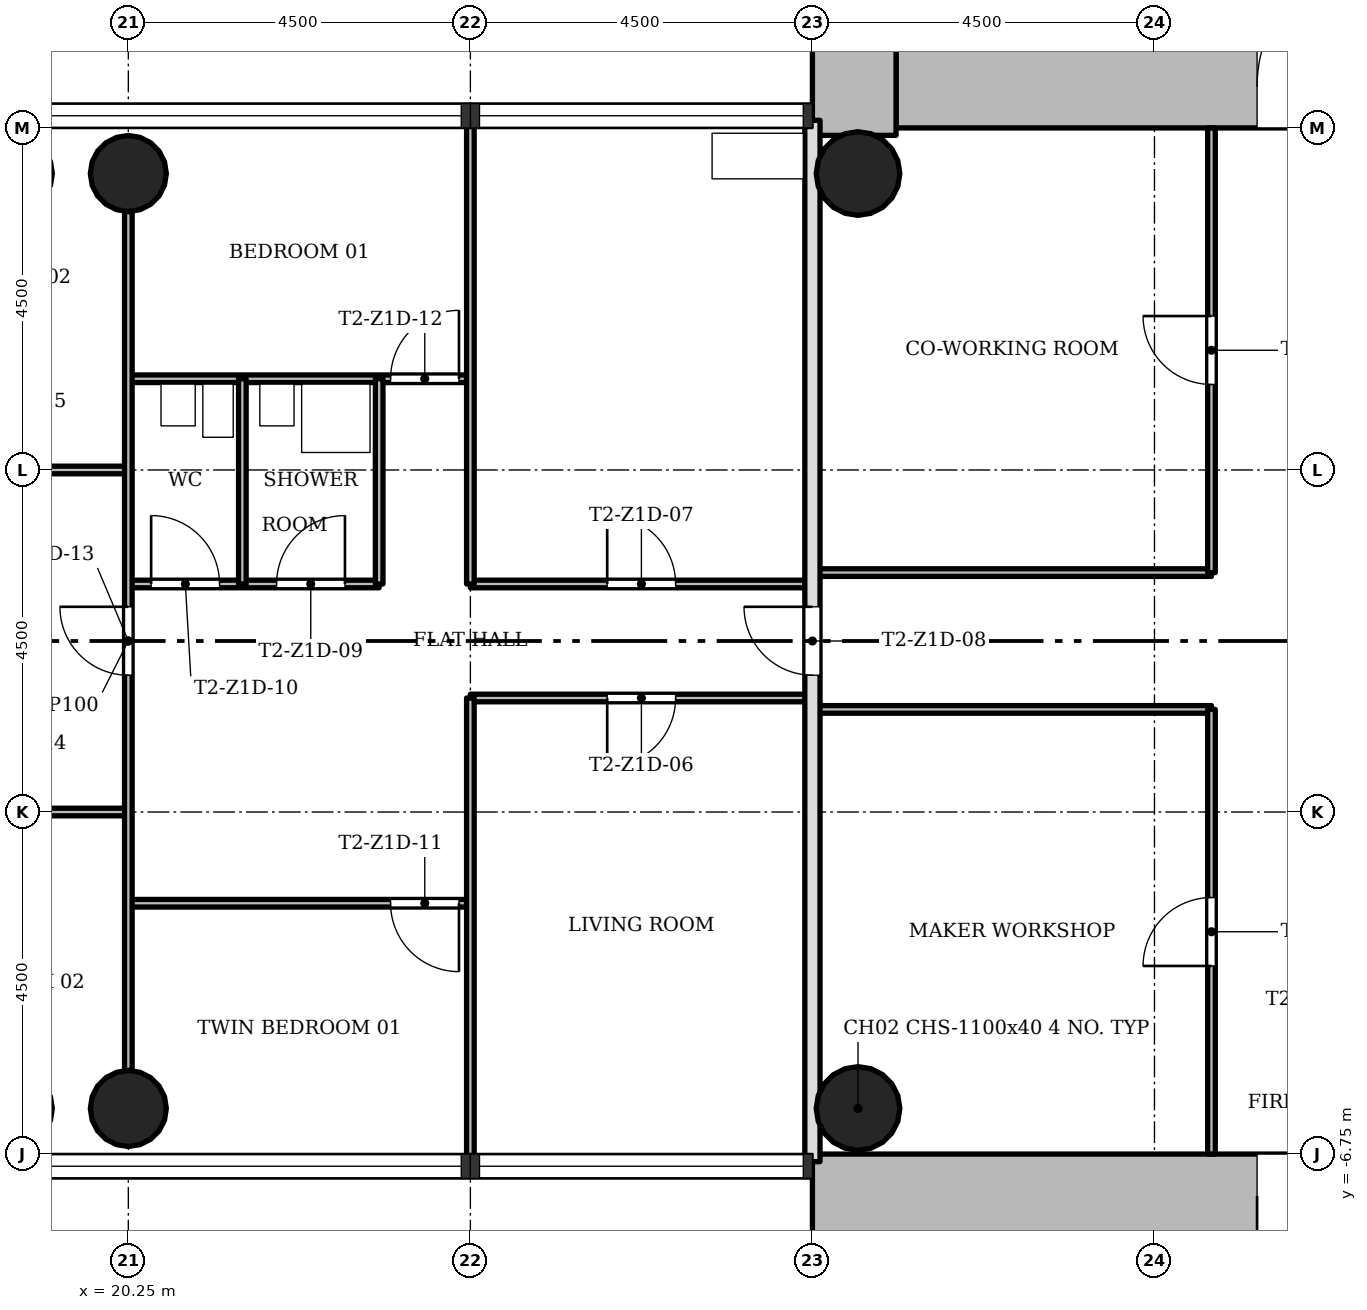
"""IFC4 building model, lengths in metres.
Left out: names, types, materials, properties, quantities, classifications, styles, units other than length and angle.
Written with IfcOpenShell. Run it as: python <this file> out.ifc"""

import sys

from ifc_helpers import new_model, si_unit, direction, frame, frame_2d, origin, origin_2d, place, context, subcontext, project, spatial, rectangle, hollow_circle, extrude, element, fill, save


model = new_model("IFC4")
c1 = context("Model", 3, precision=1e-05, world=origin(), true_north=direction((0.0, 1.0)))
c2 = subcontext(c1, "Body", "Model", "MODEL_VIEW")
j1 = project(units=[si_unit("LENGTHUNIT", "METRE"), si_unit("PLANEANGLEUNIT", "RADIAN")], contexts=[c1])
p1 = place(None, origin())
s1 = spatial("IfcSite", under=j1, at=p1, CompositionType="ELEMENT")
p2 = place(p1, origin())
s2 = spatial("IfcBuilding", under=s1, at=p2, CompositionType="ELEMENT")
p3 = place(p2, frame((0.0, 0.0, 55.1)))
s3 = spatial("IfcBuildingStorey", under=s2, at=p3, CompositionType="ELEMENT", Elevation=55.1)
p4 = place(p3, frame((30.35, 7.3, 0.0), z_axis=(0.0, 0.0, 1.0), x_axis=(1.0, 0.0, 0.0)))
e1 = element("IfcWall", 1, at=p4, inside=s3, PredefinedType="SHEAR", context=c2, shape_type="SweptSolid", body=[
    extrude(rectangle(XDim=12.4, YDim=1.1, at=frame_2d((6.2, 0.0))), origin(), (0.0, 0.0, 1.0), 3.4),
])
p5 = place(p4, frame((4.75, 0.0, 0.0)))
e2 = element("IfcOpeningElement", 2, at=p5, cuts=e1, PredefinedType="OPENING", context=c2, shape_type="SweptSolid", body=[
    extrude(rectangle(XDim=1.8, YDim=2.1, at=frame_2d((0.9, 1.05))), frame((0.0, 0.56, 0.0), z_axis=(0.0, -1.0, 0.0), x_axis=(1.0, 0.0, 0.0)), (0.0, 0.0, 1.0), 1.12),
])
p6 = place(p3, frame((29.8, 15.248, 0.0), z_axis=(0.0, 0.0, 1.0), x_axis=(0.0, -1.0, 0.0)))
e3 = element("IfcWall", 3, at=p6, inside=s3, PredefinedType="SHEAR", context=c2, shape_type="SweptSolid", body=[
    extrude(rectangle(XDim=8.596, YDim=1.1, at=frame_2d((4.298, 0.0))), origin(), (0.0, 0.0, 1.0), 3.4),
])
p7 = place(p3, frame((41.65, -7.3, 0.0), z_axis=(0.0, 0.0, 1.0), x_axis=(-1.0, 0.0, 0.0)))
e4 = element("IfcWall", 4, at=p7, inside=s3, PredefinedType="SHEAR", context=c2, shape_type="SweptSolid", body=[
    extrude(rectangle(XDim=12.4, YDim=1.1, at=frame_2d((6.2, 0.0))), origin(), (0.0, 0.0, 1.0), 3.4),
])
p8 = place(p7, frame((4.75, 0.0, 0.0)))
e5 = element("IfcOpeningElement", 5, at=p8, cuts=e4, PredefinedType="OPENING", context=c2, shape_type="SweptSolid", body=[
    extrude(rectangle(XDim=1.8, YDim=2.1, at=frame_2d((0.9, 1.05))), frame((0.0, 0.56, 0.0), z_axis=(0.0, -1.0, 0.0), x_axis=(1.0, 0.0, 0.0)), (0.0, 0.0, 1.0), 1.12),
])
for number, where, z_axis, x_axis in (
    (6, (20.25, 6.15, 0.0), (0.0, 0.0, 1.0), (1.0, 0.0, 0.0)),
    (7, (20.25, -6.15, 0.0), (0.0, 0.0, 1.0), (1.0, 0.0, 0.0)),
):
    element("IfcColumn", number, at=place(p3, frame(where, z_axis=z_axis, x_axis=x_axis)), inside=s3, PredefinedType="COLUMN", context=c2, shape_type="SweptSolid", body=[
        extrude(hollow_circle(Radius=0.5, WallThickness=0.036, at=origin_2d()), origin(), (0.0, 0.0, 1.0), 3.4),
    ])
for number, where, z_axis, x_axis in (
    (8, (29.85, 6.15, 0.0), (0.0, 0.0, 1.0), (1.0, 0.0, 0.0)),
    (9, (29.85, -6.15, 0.0), (0.0, 0.0, 1.0), (1.0, 0.0, 0.0)),
):
    element("IfcColumn", number, at=place(p3, frame(where, z_axis=z_axis, x_axis=x_axis)), inside=s3, PredefinedType="COLUMN", context=c2, shape_type="SweptSolid", body=[
        extrude(hollow_circle(Radius=0.55, WallThickness=0.04, at=origin_2d()), origin(), (0.0, 0.0, 1.0), 3.4),
    ])
p9 = place(p3, frame((24.75, -3.45, 0.0), z_axis=(0.0, 0.0, 1.0), x_axis=(-1.0, 0.0, 0.0)))
e10 = element("IfcWall", 10, at=p9, inside=s3, PredefinedType="PARTITIONING", context=c2, shape_type="SweptSolid", body=[
    extrude(rectangle(XDim=4.5, YDim=0.1, at=frame_2d((2.25, 0.0))), origin(), (0.0, 0.0, 1.0), 3.0),
])
p10 = place(p9, frame((0.15, 0.0, 0.0)))
e11 = element("IfcOpeningElement", 11, at=p10, cuts=e10, PredefinedType="OPENING", context=c2, shape_type="SweptSolid", body=[
    extrude(rectangle(XDim=0.9, YDim=2.1, at=frame_2d((0.45, 1.05))), frame((0.0, 0.06, 0.0), z_axis=(0.0, -1.0, 0.0), x_axis=(1.0, 0.0, 0.0)), (0.0, 0.0, 1.0), 0.12),
])
p11 = place(p3, frame((20.25, -2.25, 0.0), z_axis=(0.0, 0.0, 1.0), x_axis=(-1.0, 0.0, 0.0)))
e12 = element("IfcWall", 12, at=p11, inside=s3, PredefinedType="PARTITIONING", context=c2, shape_type="SweptSolid", body=[
    extrude(rectangle(XDim=4.6, YDim=0.1, at=frame_2d((2.3, 0.0))), origin(), (0.0, 0.0, 1.0), 3.0),
])
p12 = place(p11, frame((1.05, 0.0, 0.0)))
e13 = element("IfcOpeningElement", 13, at=p12, cuts=e12, PredefinedType="OPENING", context=c2, shape_type="SweptSolid", body=[
    extrude(rectangle(XDim=0.9, YDim=2.1, at=frame_2d((0.45, 1.05))), frame((0.0, 0.06, 0.0), z_axis=(0.0, -1.0, 0.0), x_axis=(1.0, 0.0, 0.0)), (0.0, 0.0, 1.0), 0.12),
])
p13 = place(p3, frame((34.5, -0.9, 0.0), z_axis=(0.0, 0.0, 1.0), x_axis=(-1.0, 0.0, 0.0)))
e14 = element("IfcWall", 14, at=p13, inside=s3, PredefinedType="PARTITIONING", context=c2, shape_type="SweptSolid", body=[
    extrude(rectangle(XDim=5.25, YDim=0.1, at=frame_2d((2.625, 0.0))), origin(), (0.0, 0.0, 1.0), 3.0),
])
p14 = place(p3, frame((29.25, -0.75, 0.0), z_axis=(0.0, 0.0, 1.0), x_axis=(-1.0, 0.0, 0.0)))
e15 = element("IfcWall", 15, at=p14, inside=s3, PredefinedType="PARTITIONING", context=c2, shape_type="SweptSolid", body=[
    extrude(rectangle(XDim=4.5, YDim=0.1, at=frame_2d((2.25, 0.0))), origin(), (0.0, 0.0, 1.0), 3.0),
])
p15 = place(p14, frame((1.8, 0.0, 0.0)))
e16 = element("IfcOpeningElement", 16, at=p15, cuts=e15, PredefinedType="OPENING", context=c2, shape_type="SweptSolid", body=[
    extrude(rectangle(XDim=0.9, YDim=2.1, at=frame_2d((0.45, 1.05))), frame((0.0, 0.06, 0.0), z_axis=(0.0, -1.0, 0.0), x_axis=(1.0, 0.0, 0.0)), (0.0, 0.0, 1.0), 0.12),
])
p16 = place(p3, frame((29.25, 0.75, 0.0), z_axis=(0.0, 0.0, 1.0), x_axis=(-1.0, 0.0, 0.0)))
e17 = element("IfcWall", 17, at=p16, inside=s3, PredefinedType="PARTITIONING", context=c2, shape_type="SweptSolid", body=[
    extrude(rectangle(XDim=4.5, YDim=0.1, at=frame_2d((2.25, 0.0))), origin(), (0.0, 0.0, 1.0), 3.0),
])
p17 = place(p16, frame((1.8, 0.0, 0.0)))
e18 = element("IfcOpeningElement", 18, at=p17, cuts=e17, PredefinedType="OPENING", context=c2, shape_type="SweptSolid", body=[
    extrude(rectangle(XDim=0.9, YDim=2.1, at=frame_2d((0.45, 1.05))), frame((0.0, 0.06, 0.0), z_axis=(0.0, -1.0, 0.0), x_axis=(1.0, 0.0, 0.0)), (0.0, 0.0, 1.0), 0.12),
])
p18 = place(p3, frame((23.55, 0.75, 0.0), z_axis=(0.0, 0.0, 1.0), x_axis=(-1.0, 0.0, 0.0)))
e19 = element("IfcWall", 19, at=p18, inside=s3, PredefinedType="PARTITIONING", context=c2, shape_type="SweptSolid", body=[
    extrude(rectangle(XDim=3.3, YDim=0.1, at=frame_2d((1.65, 0.0))), origin(), (0.0, 0.0, 1.0), 3.0),
])
p19 = place(p18, frame((0.45, 0.0, 0.0)))
e20 = element("IfcOpeningElement", 20, at=p19, cuts=e19, PredefinedType="OPENING", context=c2, shape_type="SweptSolid", body=[
    extrude(rectangle(XDim=0.9, YDim=2.1, at=frame_2d((0.45, 1.05))), frame((0.0, 0.06, 0.0), z_axis=(0.0, -1.0, 0.0), x_axis=(1.0, 0.0, 0.0)), (0.0, 0.0, 1.0), 0.12),
])
p20 = place(p18, frame((2.1, 0.0, 0.0)))
e21 = element("IfcOpeningElement", 21, at=p20, cuts=e19, PredefinedType="OPENING", context=c2, shape_type="SweptSolid", body=[
    extrude(rectangle(XDim=0.9, YDim=2.1, at=frame_2d((0.45, 1.05))), frame((0.0, 0.06, 0.0), z_axis=(0.0, -1.0, 0.0), x_axis=(1.0, 0.0, 0.0)), (0.0, 0.0, 1.0), 0.12),
])
p21 = place(p3, frame((34.5, 0.9, 0.0), z_axis=(0.0, 0.0, 1.0), x_axis=(-1.0, 0.0, 0.0)))
e22 = element("IfcWall", 22, at=p21, inside=s3, PredefinedType="PARTITIONING", context=c2, shape_type="SweptSolid", body=[
    extrude(rectangle(XDim=5.25, YDim=0.1, at=frame_2d((2.625, 0.0))), origin(), (0.0, 0.0, 1.0), 3.0),
])
p22 = place(p3, frame((20.25, 2.25, 0.0), z_axis=(0.0, 0.0, 1.0), x_axis=(-1.0, 0.0, 0.0)))
e23 = element("IfcWall", 23, at=p22, inside=s3, PredefinedType="PARTITIONING", context=c2, shape_type="SweptSolid", body=[
    extrude(rectangle(XDim=4.6, YDim=0.1, at=frame_2d((2.3, 0.0))), origin(), (0.0, 0.0, 1.0), 3.0),
])
p23 = place(p22, frame((1.05, 0.0, 0.0)))
e24 = element("IfcOpeningElement", 24, at=p23, cuts=e23, PredefinedType="OPENING", context=c2, shape_type="SweptSolid", body=[
    extrude(rectangle(XDim=0.9, YDim=2.1, at=frame_2d((0.45, 1.05))), frame((0.0, 0.06, 0.0), z_axis=(0.0, -1.0, 0.0), x_axis=(1.0, 0.0, 0.0)), (0.0, 0.0, 1.0), 0.12),
])
p24 = place(p3, frame((24.75, 3.45, 0.0), z_axis=(0.0, 0.0, 1.0), x_axis=(-1.0, 0.0, 0.0)))
e25 = element("IfcWall", 25, at=p24, inside=s3, PredefinedType="PARTITIONING", context=c2, shape_type="SweptSolid", body=[
    extrude(rectangle(XDim=4.5, YDim=0.1, at=frame_2d((2.25, 0.0))), origin(), (0.0, 0.0, 1.0), 3.0),
])
p25 = place(p24, frame((0.15, 0.0, 0.0)))
e26 = element("IfcOpeningElement", 26, at=p25, cuts=e25, PredefinedType="OPENING", context=c2, shape_type="SweptSolid", body=[
    extrude(rectangle(XDim=0.9, YDim=2.1, at=frame_2d((0.45, 1.05))), frame((0.0, 0.06, 0.0), z_axis=(0.0, -1.0, 0.0), x_axis=(1.0, 0.0, 0.0)), (0.0, 0.0, 1.0), 0.12),
])
p26 = place(p3, frame((34.5, -6.75, 0.0), z_axis=(0.0, 0.0, 1.0), x_axis=(0.0, 1.0, 0.0)))
e27 = element("IfcWall", 27, at=p26, inside=s3, PredefinedType="PARTITIONING", context=c2, shape_type="SweptSolid", body=[
    extrude(rectangle(XDim=5.85, YDim=0.1, at=frame_2d((2.925, 0.0))), origin(), (0.0, 0.0, 1.0), 3.0),
])
p27 = place(p26, frame((2.475, 0.0, 0.0)))
e28 = element("IfcOpeningElement", 28, at=p27, cuts=e27, PredefinedType="OPENING", context=c2, shape_type="SweptSolid", body=[
    extrude(rectangle(XDim=0.9, YDim=2.1, at=frame_2d((0.45, 1.05))), frame((0.0, 0.06, 0.0), z_axis=(0.0, -1.0, 0.0), x_axis=(1.0, 0.0, 0.0)), (0.0, 0.0, 1.0), 0.12),
])
p28 = place(p3, frame((34.5, 0.9, 0.0), z_axis=(0.0, 0.0, 1.0), x_axis=(0.0, 1.0, 0.0)))
e29 = element("IfcWall", 29, at=p28, inside=s3, PredefinedType="PARTITIONING", context=c2, shape_type="SweptSolid", body=[
    extrude(rectangle(XDim=5.85, YDim=0.1, at=frame_2d((2.925, 0.0))), origin(), (0.0, 0.0, 1.0), 3.0),
])
p29 = place(p28, frame((2.475, 0.0, 0.0)))
e30 = element("IfcOpeningElement", 30, at=p29, cuts=e29, PredefinedType="OPENING", context=c2, shape_type="SweptSolid", body=[
    extrude(rectangle(XDim=0.9, YDim=2.1, at=frame_2d((0.45, 1.05))), frame((0.0, 0.06, 0.0), z_axis=(0.0, -1.0, 0.0), x_axis=(1.0, 0.0, 0.0)), (0.0, 0.0, 1.0), 0.12),
])
p30 = place(p3, frame((29.25, -6.85, 0.0), z_axis=(0.0, 0.0, 1.0), x_axis=(0.0, 1.0, 0.0)))
e31 = element("IfcWall", 31, at=p30, inside=s3, PredefinedType="SOLIDWALL", context=c2, shape_type="SweptSolid", body=[
    extrude(rectangle(XDim=13.7, YDim=0.2, at=frame_2d((6.85, 0.0))), origin(), (0.0, 0.0, 1.0), 3.0),
])
p31 = place(p30, frame((6.4, 0.0, 0.0)))
e32 = element("IfcOpeningElement", 32, at=p31, cuts=e31, PredefinedType="OPENING", context=c2, shape_type="SweptSolid", body=[
    extrude(rectangle(XDim=0.9, YDim=2.1, at=frame_2d((0.45, 1.05))), frame((0.0, 0.11, 0.0), z_axis=(0.0, -1.0, 0.0), x_axis=(1.0, 0.0, 0.0)), (0.0, 0.0, 1.0), 0.22),
])
for number, where, z_axis, x_axis in (
    (33, (24.75, -6.85, 0.0), (0.0, 0.0, 1.0), (0.0, 1.0, 0.0)),
    (34, (24.75, 0.75, 0.0), (0.0, 0.0, 1.0), (0.0, 1.0, 0.0)),
):
    element("IfcWall", number, at=place(p3, frame(where, z_axis=z_axis, x_axis=x_axis)), inside=s3, PredefinedType="PARTITIONING", context=c2, shape_type="SweptSolid", body=[
        extrude(rectangle(XDim=6.1, YDim=0.1, at=frame_2d((3.05, 0.0))), origin(), (0.0, 0.0, 1.0), 3.0),
    ])
for number, where, z_axis, x_axis in (
    (35, (23.55, 0.75, 0.0), (0.0, 0.0, 1.0), (0.0, 1.0, 0.0)),
    (36, (21.75, 0.75, 0.0), (0.0, 0.0, 1.0), (0.0, 1.0, 0.0)),
):
    element("IfcWall", number, at=place(p3, frame(where, z_axis=z_axis, x_axis=x_axis)), inside=s3, PredefinedType="PARTITIONING", context=c2, shape_type="SweptSolid", body=[
        extrude(rectangle(XDim=2.7, YDim=0.1, at=frame_2d((1.35, 0.0))), origin(), (0.0, 0.0, 1.0), 3.0),
    ])
p32 = place(p3, frame((20.25, -5.65, 0.0), z_axis=(0.0, 0.0, 1.0), x_axis=(0.0, 1.0, 0.0)))
e37 = element("IfcWall", 37, at=p32, inside=s3, PredefinedType="PARTITIONING", context=c2, shape_type="SweptSolid", body=[
    extrude(rectangle(XDim=11.3, YDim=0.1, at=frame_2d((5.65, 0.0))), origin(), (0.0, 0.0, 1.0), 3.0),
])
p33 = place(p32, frame((5.2, 0.0, 0.0)))
e38 = element("IfcOpeningElement", 38, at=p33, cuts=e37, PredefinedType="OPENING", context=c2, shape_type="SweptSolid", body=[
    extrude(rectangle(XDim=0.9, YDim=2.1, at=frame_2d((0.45, 1.05))), frame((0.0, 0.06, 0.0), z_axis=(0.0, -1.0, 0.0), x_axis=(1.0, 0.0, 0.0)), (0.0, 0.0, 1.0), 0.12),
])
p34 = place(p29, origin())
e39 = element("IfcDoor", 39, at=p34, inside=s3, OperationType="SINGLE_SWING_LEFT", PredefinedType="DOOR", context=c2, shape_type="SweptSolid", body=[
    extrude(rectangle(XDim=0.9, YDim=2.1, at=frame_2d((0.45, 1.05))), frame((0.0, 0.025, 0.0), z_axis=(0.0, -1.0, 0.0), x_axis=(1.0, 0.0, 0.0)), (0.0, 0.0, 1.0), 0.05),
])
fill(e30, e39)
p35 = place(p27, origin())
e40 = element("IfcDoor", 40, at=p35, inside=s3, OperationType="SINGLE_SWING_RIGHT", PredefinedType="DOOR", context=c2, shape_type="SweptSolid", body=[
    extrude(rectangle(XDim=0.9, YDim=2.1, at=frame_2d((0.45, 1.05))), frame((0.0, 0.025, 0.0), z_axis=(0.0, -1.0, 0.0), x_axis=(1.0, 0.0, 0.0)), (0.0, 0.0, 1.0), 0.05),
])
fill(e28, e40)
p36 = place(p15, origin())
e41 = element("IfcDoor", 41, at=p36, inside=s3, OperationType="SINGLE_SWING_LEFT", PredefinedType="DOOR", context=c2, shape_type="SweptSolid", body=[
    extrude(rectangle(XDim=0.9, YDim=2.1, at=frame_2d((0.45, 1.05))), frame((0.0, 0.025, 0.0), z_axis=(0.0, -1.0, 0.0), x_axis=(1.0, 0.0, 0.0)), (0.0, 0.0, 1.0), 0.05),
])
fill(e16, e41)
p37 = place(p17, origin())
e42 = element("IfcDoor", 42, at=p37, inside=s3, OperationType="SINGLE_SWING_RIGHT", PredefinedType="DOOR", context=c2, shape_type="SweptSolid", body=[
    extrude(rectangle(XDim=0.9, YDim=2.1, at=frame_2d((0.45, 1.05))), frame((0.0, 0.025, 0.0), z_axis=(0.0, -1.0, 0.0), x_axis=(1.0, 0.0, 0.0)), (0.0, 0.0, 1.0), 0.05),
])
fill(e18, e42)
p38 = place(p31, origin())
e43 = element("IfcDoor", 43, at=p38, inside=s3, OperationType="SINGLE_SWING_LEFT", PredefinedType="DOOR", context=c2, shape_type="SweptSolid", body=[
    extrude(rectangle(XDim=0.9, YDim=2.1, at=frame_2d((0.45, 1.05))), frame((0.0, 0.025, 0.0), z_axis=(0.0, -1.0, 0.0), x_axis=(1.0, 0.0, 0.0)), (0.0, 0.0, 1.0), 0.05),
])
fill(e32, e43)
p39 = place(p19, origin())
e44 = element("IfcDoor", 44, at=p39, inside=s3, OperationType="SINGLE_SWING_LEFT", PredefinedType="DOOR", context=c2, shape_type="SweptSolid", body=[
    extrude(rectangle(XDim=0.9, YDim=2.1, at=frame_2d((0.45, 1.05))), frame((0.0, 0.025, 0.0), z_axis=(0.0, -1.0, 0.0), x_axis=(1.0, 0.0, 0.0)), (0.0, 0.0, 1.0), 0.05),
])
fill(e20, e44)
p40 = place(p20, origin())
e45 = element("IfcDoor", 45, at=p40, inside=s3, OperationType="SINGLE_SWING_RIGHT", PredefinedType="DOOR", context=c2, shape_type="SweptSolid", body=[
    extrude(rectangle(XDim=0.9, YDim=2.1, at=frame_2d((0.45, 1.05))), frame((0.0, 0.025, 0.0), z_axis=(0.0, -1.0, 0.0), x_axis=(1.0, 0.0, 0.0)), (0.0, 0.0, 1.0), 0.05),
])
fill(e21, e45)
p41 = place(p10, origin())
e46 = element("IfcDoor", 46, at=p41, inside=s3, OperationType="SINGLE_SWING_RIGHT", PredefinedType="DOOR", context=c2, shape_type="SweptSolid", body=[
    extrude(rectangle(XDim=0.9, YDim=2.1, at=frame_2d((0.45, 1.05))), frame((0.0, 0.025, 0.0), z_axis=(0.0, -1.0, 0.0), x_axis=(1.0, 0.0, 0.0)), (0.0, 0.0, 1.0), 0.05),
])
fill(e11, e46)
p42 = place(p25, origin())
e47 = element("IfcDoor", 47, at=p42, inside=s3, OperationType="SINGLE_SWING_LEFT", PredefinedType="DOOR", context=c2, shape_type="SweptSolid", body=[
    extrude(rectangle(XDim=0.9, YDim=2.1, at=frame_2d((0.45, 1.05))), frame((0.0, 0.025, 0.0), z_axis=(0.0, -1.0, 0.0), x_axis=(1.0, 0.0, 0.0)), (0.0, 0.0, 1.0), 0.05),
])
fill(e26, e47)
p43 = place(p33, origin())
e48 = element("IfcDoor", 48, at=p43, inside=s3, OperationType="SINGLE_SWING_LEFT", PredefinedType="DOOR", context=c2, shape_type="SweptSolid", body=[
    extrude(rectangle(XDim=0.9, YDim=2.1, at=frame_2d((0.45, 1.05))), frame((0.0, 0.025, 0.0), z_axis=(0.0, -1.0, 0.0), x_axis=(1.0, 0.0, 0.0)), (0.0, 0.0, 1.0), 0.05),
])
fill(e38, e48)
p44 = place(p5, origin())
e49 = element("IfcDoor", 49, at=p44, inside=s3, OperationType="SINGLE_SWING_LEFT", PredefinedType="DOOR", context=c2, shape_type="SweptSolid", body=[
    extrude(rectangle(XDim=1.8, YDim=2.1, at=frame_2d((0.9, 1.05))), frame((0.0, 0.025, 0.0), z_axis=(0.0, -1.0, 0.0), x_axis=(1.0, 0.0, 0.0)), (0.0, 0.0, 1.0), 0.05),
])
fill(e2, e49)
p45 = place(p8, origin())
e50 = element("IfcDoor", 50, at=p45, inside=s3, OperationType="SINGLE_SWING_LEFT", PredefinedType="DOOR", context=c2, shape_type="SweptSolid", body=[
    extrude(rectangle(XDim=1.8, YDim=2.1, at=frame_2d((0.9, 1.05))), frame((0.0, 0.025, 0.0), z_axis=(0.0, -1.0, 0.0), x_axis=(1.0, 0.0, 0.0)), (0.0, 0.0, 1.0), 0.05),
])
fill(e5, e50)
save(model, sys.argv[1])
